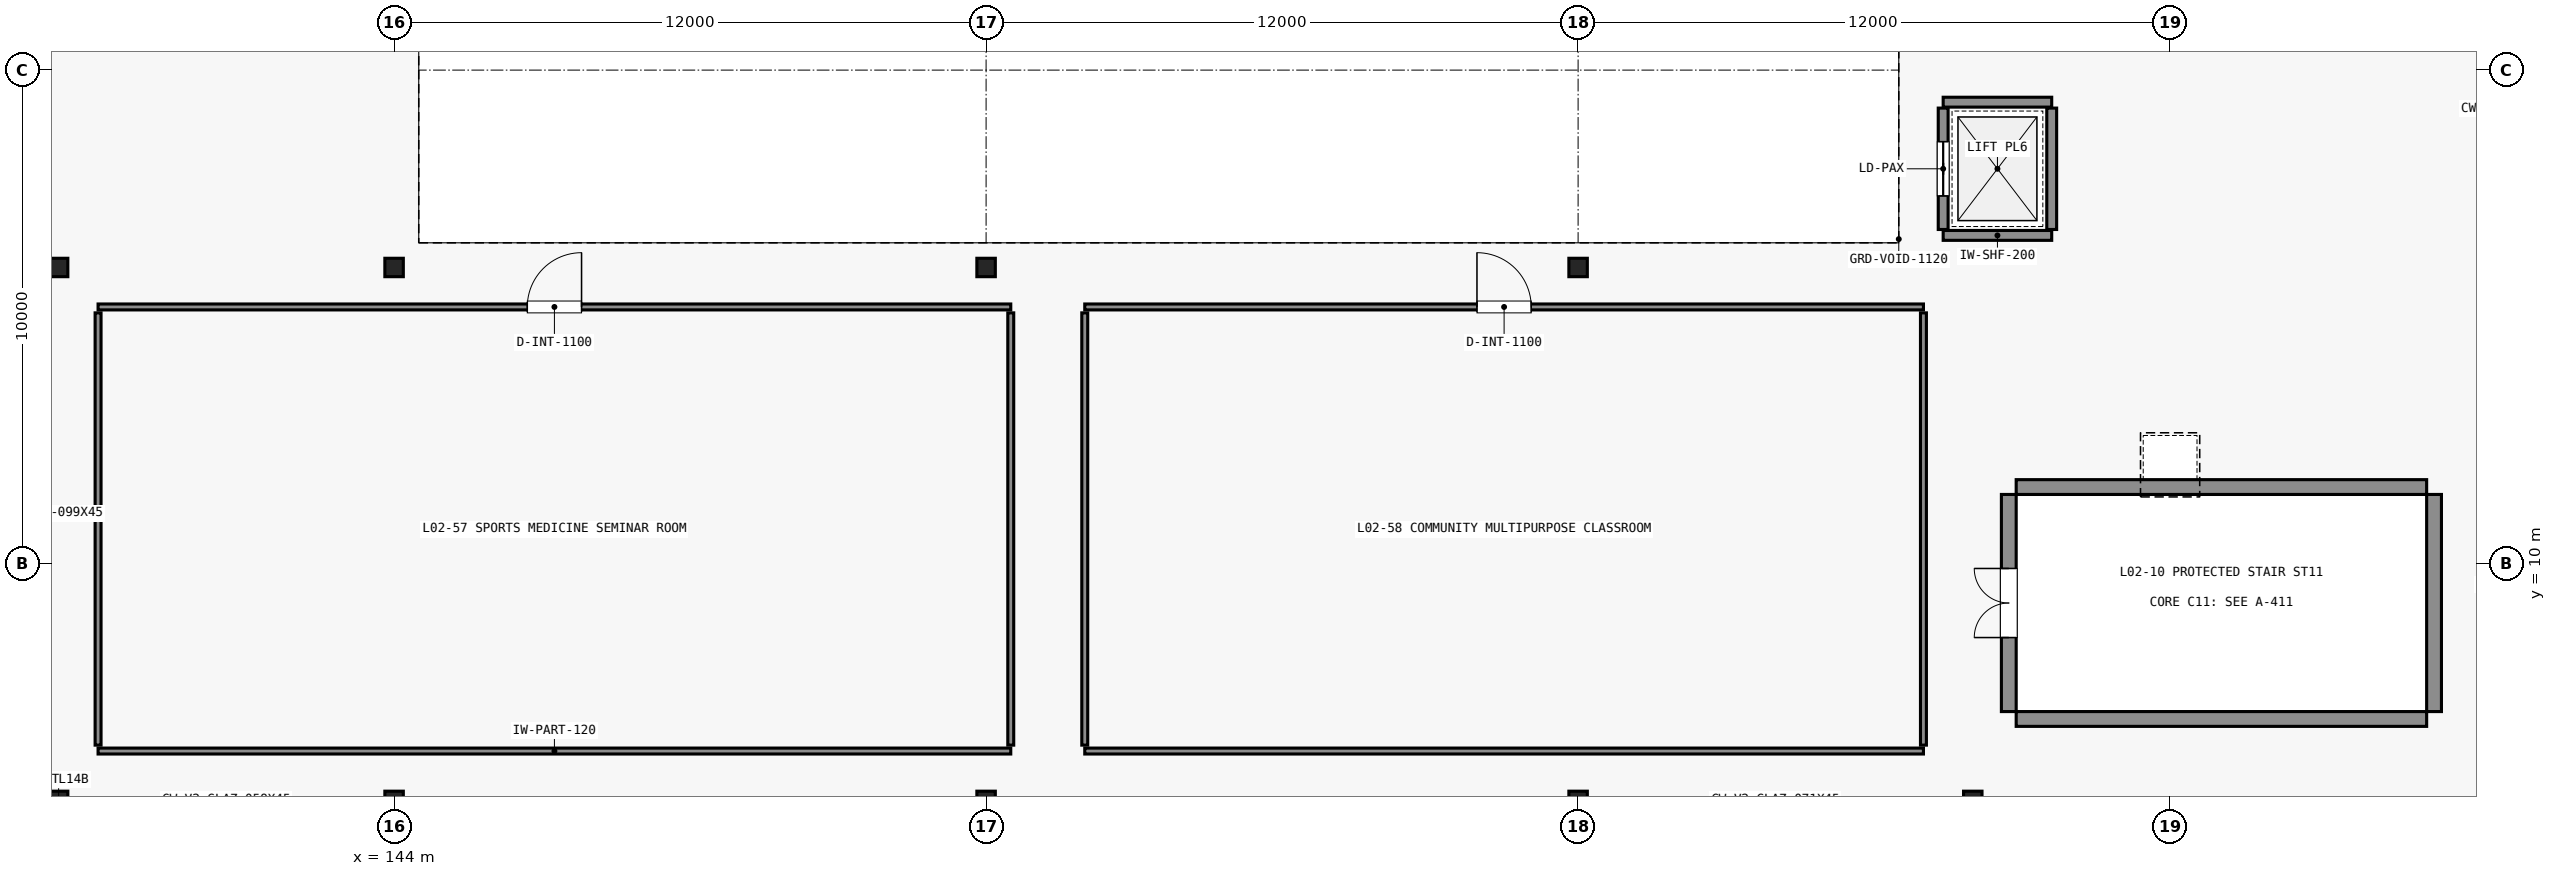
"""IFC4 building model, lengths in metres.
Left out: names, types, materials, properties, quantities, classifications, styles, units other than length and angle.
Written with IfcOpenShell. Run it as: python <this file> out.ifc"""

import sys

from ifc_helpers import new_model, si_unit, direction, frame, frame_2d, origin, origin_2d, place, context, subcontext, project, spatial, rectangle, i_section, extrude, element, fill, save


model = new_model("IFC4")
c1 = context("Model", 3, precision=1e-05, world=origin(), true_north=direction((0.0, 1.0)))
c2 = subcontext(c1, "Body", "Model", "MODEL_VIEW")
j1 = project(units=[si_unit("LENGTHUNIT", "METRE"), si_unit("PLANEANGLEUNIT", "RADIAN")], contexts=[c1])
p1 = place(None, origin())
s1 = spatial("IfcSite", under=j1, at=p1, CompositionType="ELEMENT")
p2 = place(p1, origin())
s2 = spatial("IfcBuilding", under=s1, at=p2, CompositionType="ELEMENT")
p3 = place(p2, frame((0.0, 0.0, 11.4)))
s3 = spatial("IfcBuildingStorey", under=s2, at=p3, CompositionType="ELEMENT", Elevation=11.4)
for number, where, z_axis, x_axis in (
    (1, (137.2, 5.2, 0.0), (0.0, 0.0, 1.0), (1.0, 0.0, 0.0)),
    (2, (137.2, 16.0, 0.0), (0.0, 0.0, 1.0), (1.0, 0.0, 0.0)),
    (3, (144.0, 5.2, 0.0), (0.0, 0.0, 1.0), (1.0, 0.0, 0.0)),
    (4, (144.0, 16.0, 0.0), (0.0, 0.0, 1.0), (1.0, 0.0, 0.0)),
    (5, (156.0, 5.2, 0.0), (0.0, 0.0, 1.0), (1.0, 0.0, 0.0)),
    (6, (156.0, 16.0, 0.0), (0.0, 0.0, 1.0), (1.0, 0.0, 0.0)),
    (7, (168.0, 5.2, 0.0), (0.0, 0.0, 1.0), (1.0, 0.0, 0.0)),
    (8, (168.0, 16.0, 0.0), (0.0, 0.0, 1.0), (1.0, 0.0, 0.0)),
    (9, (176.0, 5.2, 0.0), (0.0, 0.0, 1.0), (1.0, 0.0, 0.0)),
):
    element("IfcColumn", number, at=place(p3, frame(where, z_axis=z_axis, x_axis=x_axis)), inside=s3, PredefinedType="COLUMN", context=c2, shape_type="SweptSolid", body=[
        extrude(i_section(OverallWidth=0.374, OverallDepth=0.373, WebThickness=0.016, FlangeThickness=0.026, FilletRadius=0.018, at=origin_2d()), origin(), (0.0, 0.0, 1.0), 4.48),
    ])
for number, where, z_axis, x_axis in (
    (10, (176.88, 6.85, 0.0), (0.0, 0.0, 1.0), (1.0, 0.0, 0.0)),
    (11, (176.88, 11.55, 0.0), (0.0, 0.0, 1.0), (1.0, 0.0, 0.0)),
):
    element("IfcWall", number, at=place(p3, frame(where, z_axis=z_axis, x_axis=x_axis)), inside=s3, PredefinedType="SHEAR", context=c2, shape_type="SweptSolid", body=[
        extrude(rectangle(XDim=8.32, YDim=0.3, at=frame_2d((4.16, 0.0))), origin(), (0.0, 0.0, 1.0), 4.48),
    ])
p4 = place(p3, frame((176.73, 7.0, 0.0), z_axis=(0.0, 0.0, 1.0), x_axis=(0.0, 1.0, 0.0)))
e12 = element("IfcWall", 12, at=p4, inside=s3, PredefinedType="SHEAR", context=c2, shape_type="SweptSolid", body=[
    extrude(rectangle(XDim=4.4, YDim=0.3, at=frame_2d((2.2, 0.0))), origin(), (0.0, 0.0, 1.0), 4.48),
])
p5 = place(p4, frame((1.5, 0.0, 0.0)))
e13 = element("IfcOpeningElement", 13, at=p5, cuts=e12, PredefinedType="OPENING", context=c2, shape_type="SweptSolid", body=[
    extrude(rectangle(XDim=1.4, YDim=2.2, at=frame_2d((0.7, 1.1))), frame((0.0, 0.16, 0.0), z_axis=(0.0, -1.0, 0.0), x_axis=(1.0, 0.0, 0.0)), (0.0, 0.0, 1.0), 0.32),
])
p6 = place(p3, frame((185.35, 7.0, 0.0), z_axis=(0.0, 0.0, 1.0), x_axis=(0.0, 1.0, 0.0)))
e14 = element("IfcWall", 14, at=p6, inside=s3, PredefinedType="SHEAR", context=c2, shape_type="SweptSolid", body=[
    extrude(rectangle(XDim=4.4, YDim=0.3, at=frame_2d((2.2, 0.0))), origin(), (0.0, 0.0, 1.0), 4.48),
])
for number, where, z_axis, x_axis in (
    (15, (175.4, 16.65, 0.0), (0.0, 0.0, 1.0), (1.0, 0.0, 0.0)),
    (16, (175.4, 19.35, 0.0), (0.0, 0.0, 1.0), (1.0, 0.0, 0.0)),
):
    element("IfcWall", number, at=place(p3, frame(where, z_axis=z_axis, x_axis=x_axis)), inside=s3, PredefinedType="STANDARD", context=c2, shape_type="SweptSolid", body=[
        extrude(rectangle(XDim=2.2, YDim=0.2, at=frame_2d((1.1, 0.0))), origin(), (0.0, 0.0, 1.0), 4.48),
    ])
p7 = place(p3, frame((175.4, 16.77, 0.0), z_axis=(0.0, 0.0, 1.0), x_axis=(0.0, 1.0, 0.0)))
e17 = element("IfcWall", 17, at=p7, inside=s3, PredefinedType="STANDARD", context=c2, shape_type="SweptSolid", body=[
    extrude(rectangle(XDim=2.46, YDim=0.2, at=frame_2d((1.23, 0.0))), origin(), (0.0, 0.0, 1.0), 4.48),
])
p8 = place(p7, frame((0.68, 0.0, 0.0)))
e18 = element("IfcOpeningElement", 18, at=p8, cuts=e17, PredefinedType="OPENING", context=c2, shape_type="SweptSolid", body=[
    extrude(rectangle(XDim=1.1, YDim=2.15, at=frame_2d((0.55, 1.075))), frame((0.0, 0.11, 0.0), z_axis=(0.0, -1.0, 0.0), x_axis=(1.0, 0.0, 0.0)), (0.0, 0.0, 1.0), 0.22),
])
p9 = place(p3, frame((177.6, 16.77, 0.0), z_axis=(0.0, 0.0, 1.0), x_axis=(0.0, 1.0, 0.0)))
e19 = element("IfcWall", 19, at=p9, inside=s3, PredefinedType="STANDARD", context=c2, shape_type="SweptSolid", body=[
    extrude(rectangle(XDim=2.46, YDim=0.2, at=frame_2d((1.23, 0.0))), origin(), (0.0, 0.0, 1.0), 4.48),
])
p10 = place(p3, frame((138.0, 6.2, 0.0), z_axis=(0.0, 0.0, 1.0), x_axis=(1.0, 0.0, 0.0)))
e20 = element("IfcWall", 20, at=p10, inside=s3, PredefinedType="PARTITIONING", context=c2, shape_type="SweptSolid", body=[
    extrude(rectangle(XDim=18.5, YDim=0.12, at=frame_2d((9.25, 0.0))), origin(), (0.0, 0.0, 1.0), 3.787),
])
p11 = place(p3, frame((138.0, 15.2, 0.0), z_axis=(0.0, 0.0, 1.0), x_axis=(1.0, 0.0, 0.0)))
e21 = element("IfcWall", 21, at=p11, inside=s3, PredefinedType="PARTITIONING", context=c2, shape_type="SweptSolid", body=[
    extrude(rectangle(XDim=18.5, YDim=0.12, at=frame_2d((9.25, 0.0))), origin(), (0.0, 0.0, 1.0), 3.787),
])
p12 = place(p11, frame((8.7, 0.0, 0.0)))
e22 = element("IfcOpeningElement", 22, at=p12, cuts=e21, PredefinedType="OPENING", context=c2, shape_type="SweptSolid", body=[
    extrude(rectangle(XDim=1.1, YDim=2.2, at=frame_2d((0.55, 1.1))), frame((0.0, 0.07, 0.0), z_axis=(0.0, -1.0, 0.0), x_axis=(1.0, 0.0, 0.0)), (0.0, 0.0, 1.0), 0.14),
])
p13 = place(p3, frame((138.0, 6.32, 0.0), z_axis=(0.0, 0.0, 1.0), x_axis=(0.0, 1.0, 0.0)))
e23 = element("IfcWall", 23, at=p13, inside=s3, PredefinedType="PARTITIONING", context=c2, shape_type="SweptSolid", body=[
    extrude(rectangle(XDim=8.76, YDim=0.12, at=frame_2d((4.38, 0.0))), origin(), (0.0, 0.0, 1.0), 4.48),
])
p14 = place(p3, frame((156.5, 6.32, 0.0), z_axis=(0.0, 0.0, 1.0), x_axis=(0.0, 1.0, 0.0)))
e24 = element("IfcWall", 24, at=p14, inside=s3, PredefinedType="PARTITIONING", context=c2, shape_type="SweptSolid", body=[
    extrude(rectangle(XDim=8.76, YDim=0.12, at=frame_2d((4.38, 0.0))), origin(), (0.0, 0.0, 1.0), 3.787),
])
p15 = place(p3, frame((158.0, 6.2, 0.0), z_axis=(0.0, 0.0, 1.0), x_axis=(1.0, 0.0, 0.0)))
e25 = element("IfcWall", 25, at=p15, inside=s3, PredefinedType="PARTITIONING", context=c2, shape_type="SweptSolid", body=[
    extrude(rectangle(XDim=17.0, YDim=0.12, at=frame_2d((8.5, 0.0))), origin(), (0.0, 0.0, 1.0), 3.787),
])
p16 = place(p3, frame((158.0, 15.2, 0.0), z_axis=(0.0, 0.0, 1.0), x_axis=(1.0, 0.0, 0.0)))
e26 = element("IfcWall", 26, at=p16, inside=s3, PredefinedType="PARTITIONING", context=c2, shape_type="SweptSolid", body=[
    extrude(rectangle(XDim=17.0, YDim=0.12, at=frame_2d((8.5, 0.0))), origin(), (0.0, 0.0, 1.0), 3.787),
])
p17 = place(p16, frame((7.95, 0.0, 0.0)))
e27 = element("IfcOpeningElement", 27, at=p17, cuts=e26, PredefinedType="OPENING", context=c2, shape_type="SweptSolid", body=[
    extrude(rectangle(XDim=1.1, YDim=2.2, at=frame_2d((0.55, 1.1))), frame((0.0, 0.07, 0.0), z_axis=(0.0, -1.0, 0.0), x_axis=(1.0, 0.0, 0.0)), (0.0, 0.0, 1.0), 0.14),
])
p18 = place(p3, frame((158.0, 6.32, 0.0), z_axis=(0.0, 0.0, 1.0), x_axis=(0.0, 1.0, 0.0)))
e28 = element("IfcWall", 28, at=p18, inside=s3, PredefinedType="PARTITIONING", context=c2, shape_type="SweptSolid", body=[
    extrude(rectangle(XDim=8.76, YDim=0.12, at=frame_2d((4.38, 0.0))), origin(), (0.0, 0.0, 1.0), 4.074),
])
p19 = place(p3, frame((175.0, 6.32, 0.0), z_axis=(0.0, 0.0, 1.0), x_axis=(0.0, 1.0, 0.0)))
e29 = element("IfcWall", 29, at=p19, inside=s3, PredefinedType="PARTITIONING", context=c2, shape_type="SweptSolid", body=[
    extrude(rectangle(XDim=8.76, YDim=0.12, at=frame_2d((4.38, 0.0))), origin(), (0.0, 0.0, 1.0), 4.48),
])
p20 = place(p8, origin())
e30 = element("IfcDoor", 30, at=p20, inside=s3, OperationType="SLIDING_TO_LEFT", PredefinedType="DOOR", context=c2, shape_type="SweptSolid", body=[
    extrude(rectangle(XDim=1.1, YDim=2.15, at=frame_2d((0.55, 1.075))), frame((0.0, 0.025, 0.0), z_axis=(0.0, -1.0, 0.0), x_axis=(1.0, 0.0, 0.0)), (0.0, 0.0, 1.0), 0.05),
])
fill(e18, e30)
p21 = place(p5, origin())
e31 = element("IfcDoor", 31, at=p21, inside=s3, OperationType="DOUBLE_DOOR_SINGLE_SWING", PredefinedType="DOOR", context=c2, shape_type="SweptSolid", body=[
    extrude(rectangle(XDim=1.4, YDim=2.2, at=frame_2d((0.7, 1.1))), frame((0.0, 0.025, 0.0), z_axis=(0.0, -1.0, 0.0), x_axis=(1.0, 0.0, 0.0)), (0.0, 0.0, 1.0), 0.05),
])
fill(e13, e31)
p22 = place(p12, origin())
e32 = element("IfcDoor", 32, at=p22, inside=s3, OperationType="SINGLE_SWING_RIGHT", PredefinedType="DOOR", context=c2, shape_type="SweptSolid", body=[
    extrude(rectangle(XDim=1.1, YDim=2.2, at=frame_2d((0.55, 1.1))), frame((0.0, 0.025, 0.0), z_axis=(0.0, -1.0, 0.0), x_axis=(1.0, 0.0, 0.0)), (0.0, 0.0, 1.0), 0.05),
])
fill(e22, e32)
p23 = place(p17, origin())
e33 = element("IfcDoor", 33, at=p23, inside=s3, OperationType="SINGLE_SWING_LEFT", PredefinedType="DOOR", context=c2, shape_type="SweptSolid", body=[
    extrude(rectangle(XDim=1.1, YDim=2.2, at=frame_2d((0.55, 1.1))), frame((0.0, 0.025, 0.0), z_axis=(0.0, -1.0, 0.0), x_axis=(1.0, 0.0, 0.0)), (0.0, 0.0, 1.0), 0.05),
])
fill(e27, e33)
save(model, sys.argv[1])
